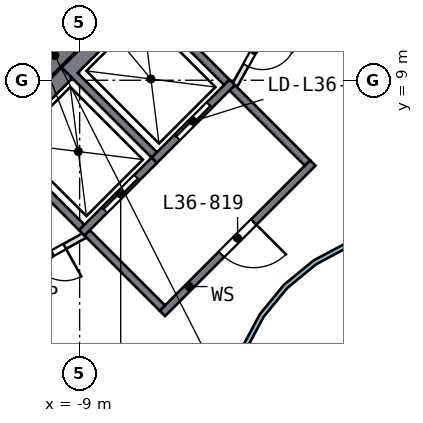
"""IFC4 building model, lengths in metres.
Left out: names, types, materials, properties, quantities, classifications, styles, units other than length and angle.
Written with IfcOpenShell. Run it as: python <this file> out.ifc"""

import sys

from ifc_helpers import new_model, si_unit, direction, frame, frame_2d, origin, place, context, subcontext, project, spatial, polyline, rectangle, outline, extrude, element, fill, save


model = new_model("IFC4")
c1 = context("Model", 3, precision=1e-05, world=origin(), true_north=direction((0.0, 1.0)))
c2 = subcontext(c1, "Body", "Model", "MODEL_VIEW")
j1 = project(units=[si_unit("LENGTHUNIT", "METRE"), si_unit("PLANEANGLEUNIT", "RADIAN")], contexts=[c1])
p1 = place(None, origin())
s1 = spatial("IfcSite", under=j1, at=p1, CompositionType="ELEMENT")
p2 = place(p1, origin())
s2 = spatial("IfcBuilding", under=s1, at=p2, CompositionType="ELEMENT")
p3 = place(p2, frame((0.0, 0.0, 150.5)))
s3 = spatial("IfcBuildingStorey", under=s2, at=p3, CompositionType="ELEMENT", Elevation=150.5)
p4 = place(p3, frame((-5.552, 13.752, 0.0), z_axis=(0.0, 0.0, 1.0), x_axis=(-0.707106781, -0.707106781, 0.0)))
e1 = element("IfcWall", 1, at=p4, inside=s3, PredefinedType="SHEAR", context=c2, shape_type="SweptSolid", body=[
    extrude(rectangle(XDim=11.598, YDim=0.7, at=frame_2d((5.799, 0.0))), origin(), (0.0, 0.0, 1.0), 3.5),
])
p5 = place(p3, origin())
e2 = element("IfcWall", 2, at=p5, inside=s3, PredefinedType="SOLIDWALL", context=c2, shape_type="SweptSolid", body=[
    extrude(outline(polyline([(-9.475, 9.334), (-7.425, 11.385), (-5.056, 9.016), (-5.197, 8.874), (-7.283, 10.96), (-9.051, 9.192), (-6.965, 7.106), (-7.106, 6.965), (-9.475, 9.334)])), origin(), (0.0, 0.0, 1.0), 3.19),
])
p6 = place(p3, frame((-4.985, 8.945, 0.0), z_axis=(0.0, 0.0, 1.0), x_axis=(-0.707106781, -0.707106781, 0.0)))
e3 = element("IfcWall", 3, at=p6, inside=s3, PredefinedType="SOLIDWALL", context=c2, shape_type="SweptSolid", body=[
    extrude(rectangle(XDim=2.9, YDim=0.2, at=frame_2d((1.45, 0.0))), origin(), (0.0, 0.0, 1.0), 3.19),
])
p7 = place(p6, frame((0.85, 0.0, 0.0)))
e4 = element("IfcOpeningElement", 4, at=p7, cuts=e3, PredefinedType="OPENING", context=c2, shape_type="SweptSolid", body=[
    extrude(rectangle(XDim=1.2, YDim=2.1, at=frame_2d((0.6, 1.05))), frame((0.0, 0.11, 0.0), z_axis=(0.0, -1.0, 0.0), x_axis=(1.0, 0.0, 0.0)), (0.0, 0.0, 1.0), 0.22),
])
p8 = place(p3, origin())
e5 = element("IfcWall", 5, at=p8, inside=s3, PredefinedType="SOLIDWALL", context=c2, shape_type="SweptSolid", body=[
    extrude(outline(polyline([(-11.385, 7.425), (-9.475, 9.334), (-9.192, 9.051), (-10.96, 7.283), (-8.874, 5.197), (-9.016, 5.056), (-11.385, 7.425)])), origin(), (0.0, 0.0, 1.0), 3.19),
])
p9 = place(p3, frame((-7.036, 6.894, 0.0), z_axis=(0.0, 0.0, 1.0), x_axis=(-0.707106781, -0.707106781, 0.0)))
e6 = element("IfcWall", 6, at=p9, inside=s3, PredefinedType="SOLIDWALL", context=c2, shape_type="SweptSolid", body=[
    extrude(rectangle(XDim=2.7, YDim=0.2, at=frame_2d((1.35, 0.0))), origin(), (0.0, 0.0, 1.0), 3.19),
])
p10 = place(p9, frame((0.65, 0.0, 0.0)))
e7 = element("IfcOpeningElement", 7, at=p10, cuts=e6, PredefinedType="OPENING", context=c2, shape_type="SweptSolid", body=[
    extrude(rectangle(XDim=1.2, YDim=2.1, at=frame_2d((0.6, 1.05))), frame((0.0, 0.11, 0.0), z_axis=(0.0, -1.0, 0.0), x_axis=(1.0, 0.0, 0.0)), (0.0, 0.0, 1.0), 0.22),
])
p11 = place(p3, frame((-2.864, 6.823, 0.0), z_axis=(0.0, 0.0, 1.0), x_axis=(-0.707106781, -0.707106781, 0.0)))
e8 = element("IfcWall", 8, at=p11, inside=s3, PredefinedType="SOLIDWALL", context=c2, shape_type="SweptSolid", body=[
    extrude(rectangle(XDim=5.6, YDim=0.2, at=frame_2d((2.8, 0.0))), origin(), (0.0, 0.0, 1.0), 3.19),
])
p12 = place(p11, frame((2.2, 0.0, 0.0)))
e9 = element("IfcOpeningElement", 9, at=p12, cuts=e8, PredefinedType="OPENING", context=c2, shape_type="SweptSolid", body=[
    extrude(rectangle(XDim=1.2, YDim=2.1, at=frame_2d((0.6, 1.05))), frame((0.0, 0.11, 0.0), z_axis=(0.0, -1.0, 0.0), x_axis=(1.0, 0.0, 0.0)), (0.0, 0.0, 1.0), 0.22),
])
for number, where, z_axis, x_axis in (
    (10, (-3.005, 6.823, 0.0), (0.0, 0.0, 1.0), (-0.707, 0.707, 0.0)),
    (11, (-6.823, 3.005, 0.0), (0.0, 0.0, 1.0), (-0.707, 0.707, 0.0)),
):
    element("IfcWall", number, at=place(p3, frame(where, z_axis=z_axis, x_axis=x_axis)), inside=s3, PredefinedType="SOLIDWALL", context=c2, shape_type="SweptSolid", body=[
        extrude(rectangle(XDim=2.8, YDim=0.2, at=frame_2d((1.4, 0.0))), origin(), (0.0, 0.0, 1.0), 3.19),
    ])
p13 = place(p3, frame((-3.9, 10.7, 0.0), z_axis=(0.0, 0.0, 1.0), x_axis=(-0.485692555, -0.874129705, 0.0)))
e12 = element("IfcWall", 12, at=p13, inside=s3, PredefinedType="PARTITIONING", context=c2, shape_type="SweptSolid", body=[
    extrude(rectangle(XDim=2.089, YDim=0.15, at=frame_2d((1.044, 0.0))), origin(), (0.0, 0.0, 1.0), 3.19),
])
p14 = place(p13, frame((0.594, 0.0, 0.0)))
e13 = element("IfcOpeningElement", 13, at=p14, cuts=e12, PredefinedType="OPENING", context=c2, shape_type="SweptSolid", body=[
    extrude(rectangle(XDim=0.9, YDim=2.1, at=frame_2d((0.45, 1.05))), frame((0.0, 0.085, 0.0), z_axis=(0.0, -1.0, 0.0), x_axis=(1.0, 0.0, 0.0)), (0.0, 0.0, 1.0), 0.17),
])
p15 = place(p3, frame((-8.874, 4.914, 0.0), z_axis=(0.0, 0.0, 1.0), x_axis=(-0.874129705, -0.485692555, 0.0)))
e14 = element("IfcWall", 14, at=p15, inside=s3, PredefinedType="PARTITIONING", context=c2, shape_type="SweptSolid", body=[
    extrude(rectangle(XDim=2.089, YDim=0.15, at=frame_2d((1.044, 0.0))), origin(), (0.0, 0.0, 1.0), 3.19),
])
p16 = place(p15, frame((0.594, 0.0, 0.0)))
e15 = element("IfcOpeningElement", 15, at=p16, cuts=e14, PredefinedType="OPENING", context=c2, shape_type="SweptSolid", body=[
    extrude(rectangle(XDim=0.9, YDim=2.1, at=frame_2d((0.45, 1.05))), frame((0.0, 0.085, 0.0), z_axis=(0.0, -1.0, 0.0), x_axis=(1.0, 0.0, 0.0)), (0.0, 0.0, 1.0), 0.17),
])
p17 = place(p3, origin())
e16 = element("IfcWall", 16, at=p17, inside=s3, PredefinedType="SOLIDWALL", context=c2, shape_type="SweptSolid", body=[
    extrude(outline(polyline([(5.021, -0.999), (4.73, -1.959), (4.257, -2.844), (3.62, -3.62), (2.844, -4.257), (1.959, -4.73), (0.999, -5.021), (0.0, -5.12), (-0.999, -5.021), (-1.959, -4.73), (-2.844, -4.257), (-3.62, -3.62), (-4.257, -2.844), (-4.73, -1.959), (-5.021, -0.999), (-5.12, 0.0), (-5.021, 0.999), (-4.73, 1.959), (-4.257, 2.844), (-3.62, 3.62), (-2.844, 4.257), (-1.959, 4.73), (-0.999, 5.021), (0.0, 5.12), (0.999, 5.021), (1.959, 4.73), (2.844, 4.257), (3.62, 3.62), (4.257, 2.844), (4.73, 1.959), (5.021, 0.999), (5.12, 0.0), (5.021, -0.999)]), holes=[polyline([(4.904, 0.976), (4.619, 1.913), (4.157, 2.778), (3.535, 3.535), (2.778, 4.157), (1.913, 4.619), (0.976, 4.904), (0.0, 5.0), (-0.976, 4.904), (-1.913, 4.619), (-2.778, 4.157), (-3.535, 3.535), (-4.157, 2.778), (-4.619, 1.913), (-4.904, 0.976), (-5.0, 0.0), (-4.904, -0.976), (-4.619, -1.913), (-4.157, -2.778), (-3.535, -3.535), (-2.778, -4.157), (-1.913, -4.619), (-0.976, -4.904), (0.0, -5.0), (0.976, -4.904), (1.913, -4.619), (2.778, -4.157), (3.535, -3.535), (4.157, -2.778), (4.619, -1.913), (4.904, -0.976), (5.0, 0.0), (4.904, 0.976)])]), origin(), (0.0, 0.0, 1.0), 3.19),
])
p18 = place(p7, origin())
e17 = element("IfcDoor", 17, at=p18, inside=s3, OperationType="DOUBLE_DOOR_SLIDING", PredefinedType="DOOR", context=c2, shape_type="SweptSolid", body=[
    extrude(rectangle(XDim=1.2, YDim=2.1, at=frame_2d((0.6, 1.05))), frame((0.0, 0.025, 0.0), z_axis=(0.0, -1.0, 0.0), x_axis=(1.0, 0.0, 0.0)), (0.0, 0.0, 1.0), 0.05),
])
fill(e4, e17)
p19 = place(p10, origin())
e18 = element("IfcDoor", 18, at=p19, inside=s3, OperationType="DOUBLE_DOOR_SLIDING", PredefinedType="DOOR", context=c2, shape_type="SweptSolid", body=[
    extrude(rectangle(XDim=1.2, YDim=2.1, at=frame_2d((0.6, 1.05))), frame((0.0, 0.025, 0.0), z_axis=(0.0, -1.0, 0.0), x_axis=(1.0, 0.0, 0.0)), (0.0, 0.0, 1.0), 0.05),
])
fill(e7, e18)
p20 = place(p12, origin())
e19 = element("IfcDoor", 19, at=p20, inside=s3, OperationType="SINGLE_SWING_LEFT", PredefinedType="DOOR", context=c2, shape_type="SweptSolid", body=[
    extrude(rectangle(XDim=1.2, YDim=2.1, at=frame_2d((0.6, 1.05))), frame((0.0, 0.025, 0.0), z_axis=(0.0, -1.0, 0.0), x_axis=(1.0, 0.0, 0.0)), (0.0, 0.0, 1.0), 0.05),
])
fill(e9, e19)
p21 = place(p14, origin())
e20 = element("IfcDoor", 20, at=p21, inside=s3, OperationType="SINGLE_SWING_LEFT", PredefinedType="DOOR", context=c2, shape_type="SweptSolid", body=[
    extrude(rectangle(XDim=0.9, YDim=2.1, at=frame_2d((0.45, 1.05))), frame((0.0, 0.025, 0.0), z_axis=(0.0, -1.0, 0.0), x_axis=(1.0, 0.0, 0.0)), (0.0, 0.0, 1.0), 0.05),
])
fill(e13, e20)
p22 = place(p16, origin())
e21 = element("IfcDoor", 21, at=p22, inside=s3, OperationType="SINGLE_SWING_LEFT", PredefinedType="DOOR", context=c2, shape_type="SweptSolid", body=[
    extrude(rectangle(XDim=0.9, YDim=2.1, at=frame_2d((0.45, 1.05))), frame((0.0, 0.025, 0.0), z_axis=(0.0, -1.0, 0.0), x_axis=(1.0, 0.0, 0.0)), (0.0, 0.0, 1.0), 0.05),
])
fill(e15, e21)
save(model, sys.argv[1])
